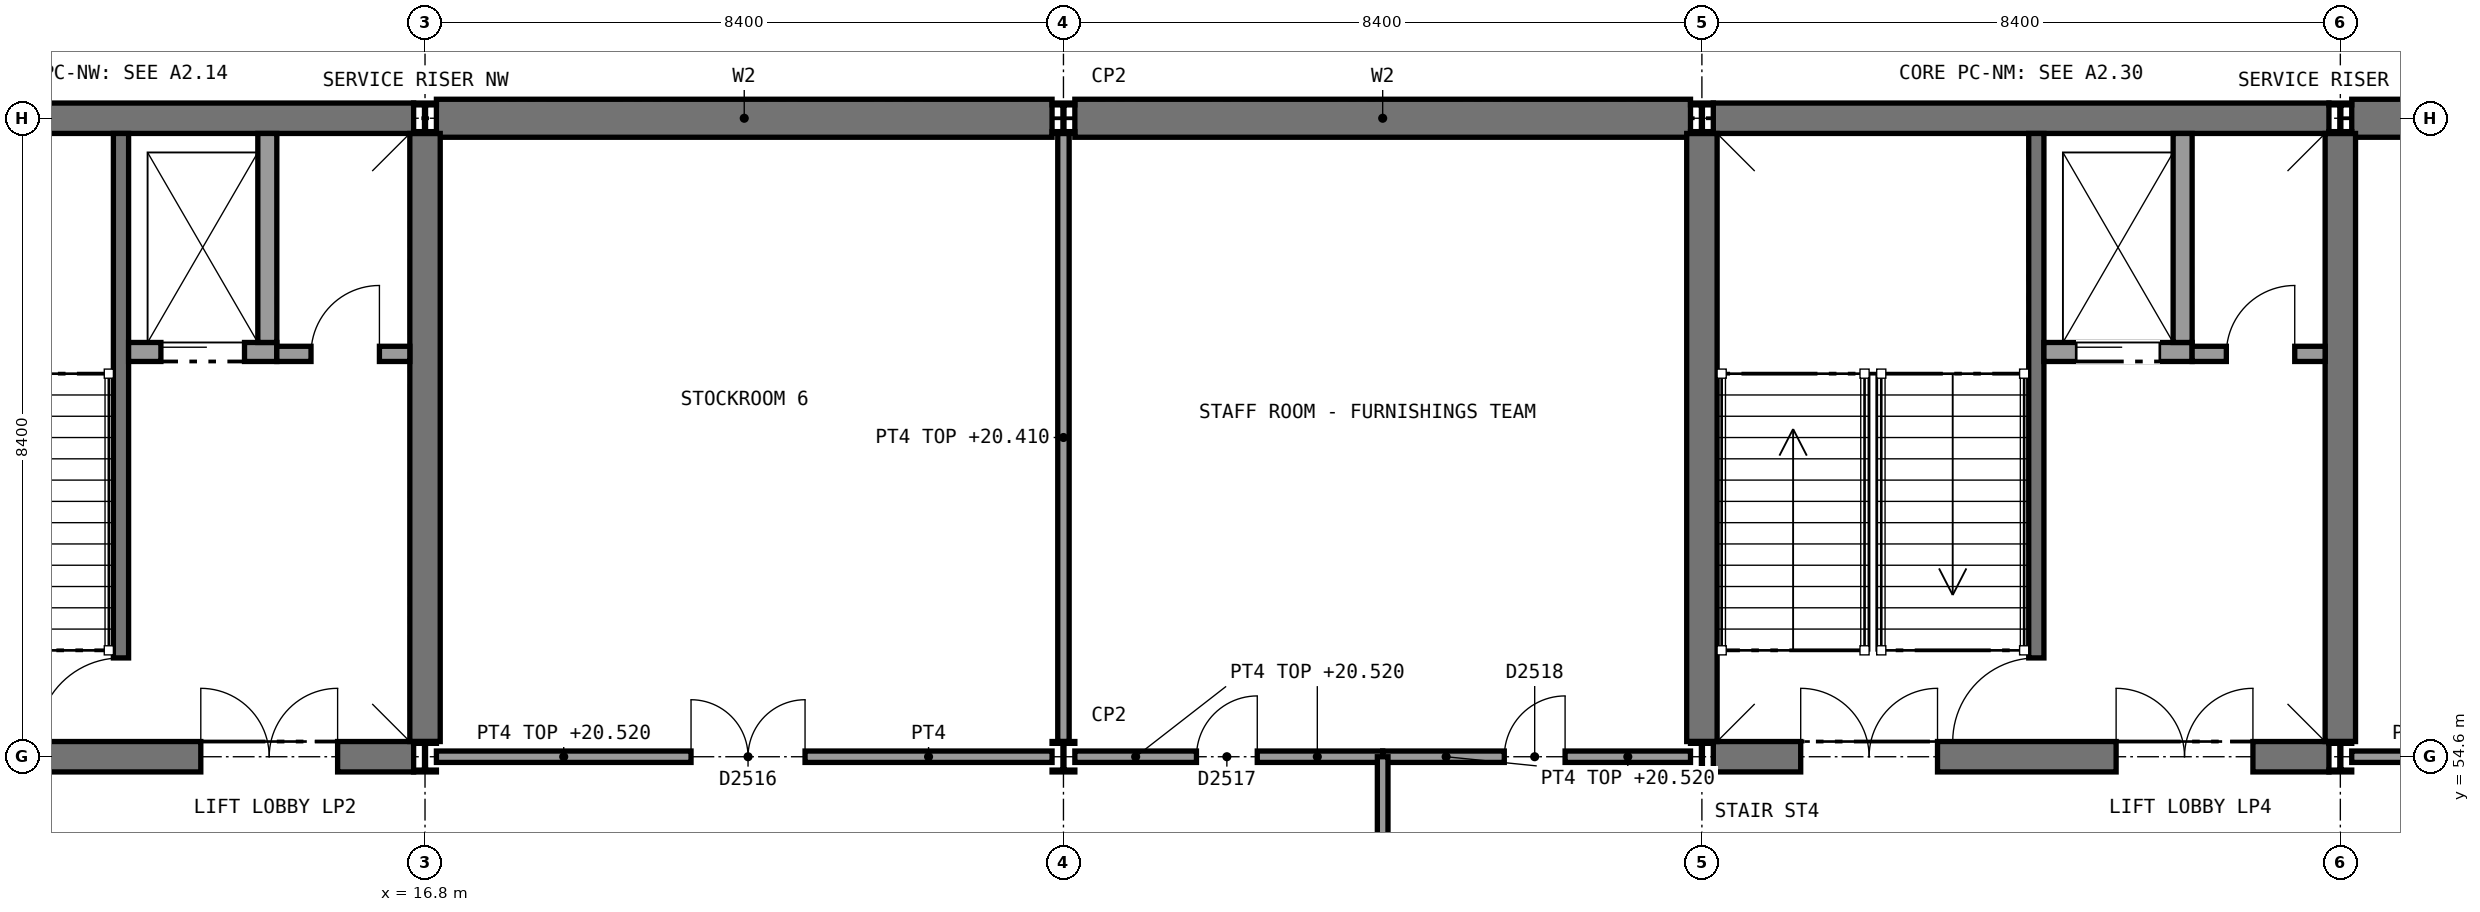
"""IFC4 building model, lengths in metres.
Left out: names, types, materials, properties, quantities, classifications, styles, units other than length and angle.
Written with IfcOpenShell. Run it as: python <this file> out.ifc"""

import sys

from ifc_helpers import new_model, si_unit, direction, frame, frame_2d, origin, origin_2d, place, context, subcontext, project, spatial, rectangle, i_section, extrude, element, fill, save


model = new_model("IFC4")
c1 = context("Model", 3, precision=1e-05, world=origin(), true_north=direction((0.0, 1.0)))
c2 = subcontext(c1, "Body", "Model", "MODEL_VIEW")
j1 = project(units=[si_unit("LENGTHUNIT", "METRE"), si_unit("PLANEANGLEUNIT", "RADIAN")], contexts=[c1])
p1 = place(None, origin())
s1 = spatial("IfcSite", under=j1, at=p1, CompositionType="ELEMENT")
p2 = place(p1, origin())
s2 = spatial("IfcBuilding", under=s1, at=p2, CompositionType="ELEMENT")
p3 = place(p2, frame((0.0, 0.0, 16.2)))
s3 = spatial("IfcBuildingStorey", under=s2, at=p3, CompositionType="ELEMENT", Elevation=16.2)
p4 = place(p3, frame((16.95, 63.0, 0.0), z_axis=(0.0, 0.0, 1.0), x_axis=(1.0, 0.0, 0.0)))
e1 = element("IfcWall", 1, at=p4, inside=s3, PredefinedType="SHEAR", context=c2, shape_type="SweptSolid", body=[
    extrude(rectangle(XDim=8.1, YDim=0.5, at=frame_2d((4.05, 0.0))), origin(), (0.0, 0.0, 1.0), 4.65),
])
p5 = place(p3, frame((25.35, 63.0, 0.0), z_axis=(0.0, 0.0, 1.0), x_axis=(1.0, 0.0, 0.0)))
e2 = element("IfcWall", 2, at=p5, inside=s3, PredefinedType="SHEAR", context=c2, shape_type="SweptSolid", body=[
    extrude(rectangle(XDim=8.1, YDim=0.5, at=frame_2d((4.05, 0.0))), origin(), (0.0, 0.0, 1.0), 4.65),
])
p6 = place(p3, frame((42.15, 63.0, 0.0), z_axis=(0.0, 0.0, 1.0), x_axis=(1.0, 0.0, 0.0)))
e3 = element("IfcWall", 3, at=p6, inside=s3, PredefinedType="SHEAR", context=c2, shape_type="SweptSolid", body=[
    extrude(rectangle(XDim=8.1, YDim=0.5, at=frame_2d((4.05, 0.0))), origin(), (0.0, 0.0, 1.0), 4.65),
])
p7 = place(p3, frame((8.55, 63.0, 0.0), z_axis=(0.0, 0.0, 1.0), x_axis=(1.0, 0.0, 0.0)))
e4 = element("IfcWall", 4, at=p7, inside=s3, PredefinedType="SHEAR", context=c2, shape_type="SweptSolid", body=[
    extrude(rectangle(XDim=8.1, YDim=0.4, at=frame_2d((4.05, 0.0))), origin(), (0.0, 0.0, 1.0), 4.65),
])
p8 = place(p3, frame((8.55, 54.6, 0.0), z_axis=(0.0, 0.0, 1.0), x_axis=(1.0, 0.0, 0.0)))
e5 = element("IfcWall", 5, at=p8, inside=s3, PredefinedType="SHEAR", context=c2, shape_type="SweptSolid", body=[
    extrude(rectangle(XDim=8.1, YDim=0.4, at=frame_2d((4.05, 0.0))), origin(), (0.0, 0.0, 1.0), 4.65),
])
p9 = place(p8, frame((1.15, 0.0, 0.0)))
e6 = element("IfcOpeningElement", 6, at=p9, cuts=e5, PredefinedType="OPENING", context=c2, shape_type="SweptSolid", body=[
    extrude(rectangle(XDim=1.8, YDim=2.1, at=frame_2d((0.9, 1.05))), frame((0.0, 0.21, 0.0), z_axis=(0.0, -1.0, 0.0), x_axis=(1.0, 0.0, 0.0)), (0.0, 0.0, 1.0), 0.42),
])
p10 = place(p8, frame((5.3, 0.0, 0.0)))
e7 = element("IfcOpeningElement", 7, at=p10, cuts=e5, PredefinedType="OPENING", context=c2, shape_type="SweptSolid", body=[
    extrude(rectangle(XDim=1.8, YDim=2.1, at=frame_2d((0.9, 1.05))), frame((0.0, 0.21, 0.0), z_axis=(0.0, -1.0, 0.0), x_axis=(1.0, 0.0, 0.0)), (0.0, 0.0, 1.0), 0.42),
])
p11 = place(p3, frame((16.8, 54.8, 0.0), z_axis=(0.0, 0.0, 1.0), x_axis=(0.0, 1.0, 0.0)))
e8 = element("IfcWall", 8, at=p11, inside=s3, PredefinedType="SHEAR", context=c2, shape_type="SweptSolid", body=[
    extrude(rectangle(XDim=8.0, YDim=0.4, at=frame_2d((4.0, 0.0))), origin(), (0.0, 0.0, 1.0), 4.65),
])
p12 = place(p3, frame((33.75, 63.0, 0.0), z_axis=(0.0, 0.0, 1.0), x_axis=(1.0, 0.0, 0.0)))
e9 = element("IfcWall", 9, at=p12, inside=s3, PredefinedType="SHEAR", context=c2, shape_type="SweptSolid", body=[
    extrude(rectangle(XDim=8.1, YDim=0.4, at=frame_2d((4.05, 0.0))), origin(), (0.0, 0.0, 1.0), 4.65),
])
p13 = place(p3, frame((33.75, 54.6, 0.0), z_axis=(0.0, 0.0, 1.0), x_axis=(1.0, 0.0, 0.0)))
e10 = element("IfcWall", 10, at=p13, inside=s3, PredefinedType="SHEAR", context=c2, shape_type="SweptSolid", body=[
    extrude(rectangle(XDim=8.1, YDim=0.4, at=frame_2d((4.05, 0.0))), origin(), (0.0, 0.0, 1.0), 4.65),
])
p14 = place(p13, frame((1.15, 0.0, 0.0)))
e11 = element("IfcOpeningElement", 11, at=p14, cuts=e10, PredefinedType="OPENING", context=c2, shape_type="SweptSolid", body=[
    extrude(rectangle(XDim=1.8, YDim=2.1, at=frame_2d((0.9, 1.05))), frame((0.0, 0.21, 0.0), z_axis=(0.0, -1.0, 0.0), x_axis=(1.0, 0.0, 0.0)), (0.0, 0.0, 1.0), 0.42),
])
p15 = place(p13, frame((5.3, 0.0, 0.0)))
e12 = element("IfcOpeningElement", 12, at=p15, cuts=e10, PredefinedType="OPENING", context=c2, shape_type="SweptSolid", body=[
    extrude(rectangle(XDim=1.8, YDim=2.1, at=frame_2d((0.9, 1.05))), frame((0.0, 0.21, 0.0), z_axis=(0.0, -1.0, 0.0), x_axis=(1.0, 0.0, 0.0)), (0.0, 0.0, 1.0), 0.42),
])
for number, where, z_axis, x_axis in (
    (13, (33.6, 54.8, 0.0), (0.0, 0.0, 1.0), (0.0, 1.0, 0.0)),
    (14, (42.0, 54.8, 0.0), (0.0, 0.0, 1.0), (0.0, 1.0, 0.0)),
):
    element("IfcWall", number, at=place(p3, frame(where, z_axis=z_axis, x_axis=x_axis)), inside=s3, PredefinedType="SHEAR", context=c2, shape_type="SweptSolid", body=[
        extrude(rectangle(XDim=8.0, YDim=0.4, at=frame_2d((4.0, 0.0))), origin(), (0.0, 0.0, 1.0), 4.65),
    ])
for number, where, z_axis, x_axis in (
    (15, (16.8, 54.6, 0.0), (0.0, 0.0, 1.0), (1.0, 0.0, 0.0)),
    (16, (16.8, 63.0, 0.0), (0.0, 0.0, 1.0), (1.0, 0.0, 0.0)),
    (17, (25.2, 54.6, 0.0), (0.0, 0.0, 1.0), (1.0, 0.0, 0.0)),
    (18, (25.2, 63.0, 0.0), (0.0, 0.0, 1.0), (1.0, 0.0, 0.0)),
    (19, (33.6, 54.6, 0.0), (0.0, 0.0, 1.0), (1.0, 0.0, 0.0)),
    (20, (33.6, 63.0, 0.0), (0.0, 0.0, 1.0), (1.0, 0.0, 0.0)),
    (21, (42.0, 54.6, 0.0), (0.0, 0.0, 1.0), (1.0, 0.0, 0.0)),
    (22, (42.0, 63.0, 0.0), (0.0, 0.0, 1.0), (1.0, 0.0, 0.0)),
):
    element("IfcColumn", number, at=place(p3, frame(where, z_axis=z_axis, x_axis=x_axis)), inside=s3, PredefinedType="COLUMN", context=c2, shape_type="SweptSolid", body=[
        extrude(i_section(OverallWidth=0.3, OverallDepth=0.4, WebThickness=0.013, FlangeThickness=0.024, FilletRadius=0.027, at=origin_2d()), origin(), (0.0, 0.0, 1.0), 4.8),
    ])
p16 = place(p3, frame((25.2, 54.8, 0.0), z_axis=(0.0, 0.0, 1.0), x_axis=(0.0, 1.0, 0.0)))
e23 = element("IfcWall", 23, at=p16, inside=s3, PredefinedType="SOLIDWALL", context=c2, shape_type="SweptSolid", body=[
    extrude(rectangle(XDim=8.0, YDim=0.15, at=frame_2d((4.0, 0.0))), origin(), (0.0, 0.0, 1.0), 4.21),
])
p17 = place(p3, frame((16.95, 54.6, 0.0), z_axis=(0.0, 0.0, 1.0), x_axis=(1.0, 0.0, 0.0)))
e24 = element("IfcWall", 24, at=p17, inside=s3, PredefinedType="SOLIDWALL", context=c2, shape_type="SweptSolid", body=[
    extrude(rectangle(XDim=8.1, YDim=0.15, at=frame_2d((4.05, 0.0))), origin(), (0.0, 0.0, 1.0), 4.32),
])
p18 = place(p17, frame((3.35, 0.0, 0.0)))
e25 = element("IfcOpeningElement", 25, at=p18, cuts=e24, PredefinedType="OPENING", context=c2, shape_type="SweptSolid", body=[
    extrude(rectangle(XDim=1.5, YDim=2.1, at=frame_2d((0.75, 1.05))), frame((0.0, 0.085, 0.0), z_axis=(0.0, -1.0, 0.0), x_axis=(1.0, 0.0, 0.0)), (0.0, 0.0, 1.0), 0.17),
])
p19 = place(p3, frame((25.35, 54.6, 0.0), z_axis=(0.0, 0.0, 1.0), x_axis=(1.0, 0.0, 0.0)))
e26 = element("IfcWall", 26, at=p19, inside=s3, PredefinedType="SOLIDWALL", context=c2, shape_type="SweptSolid", body=[
    extrude(rectangle(XDim=4.05, YDim=0.15, at=frame_2d((2.025, 0.0))), origin(), (0.0, 0.0, 1.0), 4.32),
])
p20 = place(p19, frame((1.6, 0.0, 0.0)))
e27 = element("IfcOpeningElement", 27, at=p20, cuts=e26, PredefinedType="OPENING", context=c2, shape_type="SweptSolid", body=[
    extrude(rectangle(XDim=0.8, YDim=2.1, at=frame_2d((0.4, 1.05))), frame((0.0, 0.085, 0.0), z_axis=(0.0, -1.0, 0.0), x_axis=(1.0, 0.0, 0.0)), (0.0, 0.0, 1.0), 0.17),
])
p21 = place(p3, frame((29.4, 54.6, 0.0), z_axis=(0.0, 0.0, 1.0), x_axis=(1.0, 0.0, 0.0)))
e28 = element("IfcWall", 28, at=p21, inside=s3, PredefinedType="SOLIDWALL", context=c2, shape_type="SweptSolid", body=[
    extrude(rectangle(XDim=4.05, YDim=0.15, at=frame_2d((2.025, 0.0))), origin(), (0.0, 0.0, 1.0), 4.32),
])
p22 = place(p21, frame((1.6, 0.0, 0.0)))
e29 = element("IfcOpeningElement", 29, at=p22, cuts=e28, PredefinedType="OPENING", context=c2, shape_type="SweptSolid", body=[
    extrude(rectangle(XDim=0.8, YDim=2.1, at=frame_2d((0.4, 1.05))), frame((0.0, 0.085, 0.0), z_axis=(0.0, -1.0, 0.0), x_axis=(1.0, 0.0, 0.0)), (0.0, 0.0, 1.0), 0.17),
])
p23 = place(p3, frame((42.15, 54.6, 0.0), z_axis=(0.0, 0.0, 1.0), x_axis=(1.0, 0.0, 0.0)))
e30 = element("IfcWall", 30, at=p23, inside=s3, PredefinedType="SOLIDWALL", context=c2, shape_type="SweptSolid", body=[
    extrude(rectangle(XDim=8.1, YDim=0.15, at=frame_2d((4.05, 0.0))), origin(), (0.0, 0.0, 1.0), 4.32),
])
p24 = place(p23, frame((3.35, 0.0, 0.0)))
e31 = element("IfcOpeningElement", 31, at=p24, cuts=e30, PredefinedType="OPENING", context=c2, shape_type="SweptSolid", body=[
    extrude(rectangle(XDim=1.5, YDim=2.1, at=frame_2d((0.75, 1.05))), frame((0.0, 0.085, 0.0), z_axis=(0.0, -1.0, 0.0), x_axis=(1.0, 0.0, 0.0)), (0.0, 0.0, 1.0), 0.17),
])
p25 = place(p3, frame((29.4, 47.2, 0.0), z_axis=(0.0, 0.0, 1.0), x_axis=(0.0, 1.0, 0.0)))
e32 = element("IfcWall", 32, at=p25, inside=s3, PredefinedType="PARTITIONING", context=c2, shape_type="SweptSolid", body=[
    extrude(rectangle(XDim=7.4, YDim=0.14, at=frame_2d((3.7, 0.0))), origin(), (0.0, 0.0, 1.0), 4.65),
])
p26 = place(p3, frame((12.8, 62.8, 0.0), z_axis=(0.0, 0.0, 1.0), x_axis=(0.0, -1.0, 0.0)))
e33 = element("IfcWall", 33, at=p26, inside=s3, PredefinedType="SHEAR", context=c2, shape_type="SweptSolid", body=[
    extrude(rectangle(XDim=8.0, YDim=0.2, at=frame_2d((4.0, 0.0))), origin(), (0.0, 0.0, 1.0), 4.65),
])
p27 = place(p26, frame((6.9, 0.0, 0.0)))
e34 = element("IfcOpeningElement", 34, at=p27, cuts=e33, PredefinedType="OPENING", context=c2, shape_type="SweptSolid", body=[
    extrude(rectangle(XDim=1.11, YDim=2.1, at=frame_2d((0.555, 1.05))), frame((0.0, 0.11, 0.0), z_axis=(0.0, -1.0, 0.0), x_axis=(1.0, 0.0, 0.0)), (0.0, 0.0, 1.0), 0.22),
])
p28 = place(p3, frame((12.9, 59.925, 0.0), z_axis=(0.0, 0.0, 1.0), x_axis=(1.0, 0.0, 0.0)))
e35 = element("IfcWall", 35, at=p28, inside=s3, PredefinedType="SOLIDWALL", context=c2, shape_type="SweptSolid", body=[
    extrude(rectangle(XDim=1.95, YDim=0.25, at=frame_2d((0.975, 0.0))), origin(), (0.0, 0.0, 1.0), 4.8),
])
p29 = place(p28, frame((0.425, 0.0, 0.0)))
e36 = element("IfcOpeningElement", 36, at=p29, cuts=e35, PredefinedType="OPENING", context=c2, shape_type="SweptSolid", body=[
    extrude(rectangle(XDim=1.1, YDim=2.1, at=frame_2d((0.55, 1.05))), frame((0.0, 0.135, 0.0), z_axis=(0.0, -1.0, 0.0), x_axis=(1.0, 0.0, 0.0)), (0.0, 0.0, 1.0), 0.27),
])
p30 = place(p3, frame((14.725, 62.8, 0.0), z_axis=(0.0, 0.0, 1.0), x_axis=(0.0, -1.0, 0.0)))
e37 = element("IfcWall", 37, at=p30, inside=s3, PredefinedType="SOLIDWALL", context=c2, shape_type="SweptSolid", body=[
    extrude(rectangle(XDim=2.75, YDim=0.25, at=frame_2d((1.375, 0.0))), origin(), (0.0, 0.0, 1.0), 4.8),
])
p31 = place(p3, frame((14.85, 59.9, 0.0), z_axis=(0.0, 0.0, 1.0), x_axis=(1.0, 0.0, 0.0)))
e38 = element("IfcWall", 38, at=p31, inside=s3, PredefinedType="PARTITIONING", context=c2, shape_type="SweptSolid", body=[
    extrude(rectangle(XDim=1.75, YDim=0.2, at=frame_2d((0.875, 0.0))), origin(), (0.0, 0.0, 1.0), 4.65),
])
p32 = place(p31, frame((0.45, 0.0, 0.0)))
e39 = element("IfcOpeningElement", 39, at=p32, cuts=e38, PredefinedType="OPENING", context=c2, shape_type="SweptSolid", body=[
    extrude(rectangle(XDim=0.9, YDim=2.1, at=frame_2d((0.45, 1.05))), frame((0.0, 0.11, 0.0), z_axis=(0.0, -1.0, 0.0), x_axis=(1.0, 0.0, 0.0)), (0.0, 0.0, 1.0), 0.22),
])
p33 = place(p3, frame((38.0, 62.8, 0.0), z_axis=(0.0, 0.0, 1.0), x_axis=(0.0, -1.0, 0.0)))
e40 = element("IfcWall", 40, at=p33, inside=s3, PredefinedType="SHEAR", context=c2, shape_type="SweptSolid", body=[
    extrude(rectangle(XDim=8.0, YDim=0.2, at=frame_2d((4.0, 0.0))), origin(), (0.0, 0.0, 1.0), 4.65),
])
p34 = place(p33, frame((6.9, 0.0, 0.0)))
e41 = element("IfcOpeningElement", 41, at=p34, cuts=e40, PredefinedType="OPENING", context=c2, shape_type="SweptSolid", body=[
    extrude(rectangle(XDim=1.11, YDim=2.1, at=frame_2d((0.555, 1.05))), frame((0.0, 0.11, 0.0), z_axis=(0.0, -1.0, 0.0), x_axis=(1.0, 0.0, 0.0)), (0.0, 0.0, 1.0), 0.22),
])
p35 = place(p3, frame((38.1, 59.925, 0.0), z_axis=(0.0, 0.0, 1.0), x_axis=(1.0, 0.0, 0.0)))
e42 = element("IfcWall", 42, at=p35, inside=s3, PredefinedType="SOLIDWALL", context=c2, shape_type="SweptSolid", body=[
    extrude(rectangle(XDim=1.95, YDim=0.25, at=frame_2d((0.975, 0.0))), origin(), (0.0, 0.0, 1.0), 4.8),
])
p36 = place(p35, frame((0.425, 0.0, 0.0)))
e43 = element("IfcOpeningElement", 43, at=p36, cuts=e42, PredefinedType="OPENING", context=c2, shape_type="SweptSolid", body=[
    extrude(rectangle(XDim=1.1, YDim=2.1, at=frame_2d((0.55, 1.05))), frame((0.0, 0.135, 0.0), z_axis=(0.0, -1.0, 0.0), x_axis=(1.0, 0.0, 0.0)), (0.0, 0.0, 1.0), 0.27),
])
p37 = place(p3, frame((39.925, 62.8, 0.0), z_axis=(0.0, 0.0, 1.0), x_axis=(0.0, -1.0, 0.0)))
e44 = element("IfcWall", 44, at=p37, inside=s3, PredefinedType="SOLIDWALL", context=c2, shape_type="SweptSolid", body=[
    extrude(rectangle(XDim=2.75, YDim=0.25, at=frame_2d((1.375, 0.0))), origin(), (0.0, 0.0, 1.0), 4.8),
])
p38 = place(p3, frame((40.05, 59.9, 0.0), z_axis=(0.0, 0.0, 1.0), x_axis=(1.0, 0.0, 0.0)))
e45 = element("IfcWall", 45, at=p38, inside=s3, PredefinedType="PARTITIONING", context=c2, shape_type="SweptSolid", body=[
    extrude(rectangle(XDim=1.75, YDim=0.2, at=frame_2d((0.875, 0.0))), origin(), (0.0, 0.0, 1.0), 4.65),
])
p39 = place(p38, frame((0.45, 0.0, 0.0)))
e46 = element("IfcOpeningElement", 46, at=p39, cuts=e45, PredefinedType="OPENING", context=c2, shape_type="SweptSolid", body=[
    extrude(rectangle(XDim=0.9, YDim=2.1, at=frame_2d((0.45, 1.05))), frame((0.0, 0.11, 0.0), z_axis=(0.0, -1.0, 0.0), x_axis=(1.0, 0.0, 0.0)), (0.0, 0.0, 1.0), 0.22),
])
p40 = place(p18, origin())
e47 = element("IfcDoor", 47, at=p40, inside=s3, OperationType="DOUBLE_DOOR_SINGLE_SWING", PredefinedType="DOOR", context=c2, shape_type="SweptSolid", body=[
    extrude(rectangle(XDim=1.5, YDim=2.1, at=frame_2d((0.75, 1.05))), frame((0.0, 0.025, 0.0), z_axis=(0.0, -1.0, 0.0), x_axis=(1.0, 0.0, 0.0)), (0.0, 0.0, 1.0), 0.05),
])
fill(e25, e47)
p41 = place(p20, origin())
e48 = element("IfcDoor", 48, at=p41, inside=s3, OperationType="SINGLE_SWING_RIGHT", PredefinedType="DOOR", context=c2, shape_type="SweptSolid", body=[
    extrude(rectangle(XDim=0.8, YDim=2.1, at=frame_2d((0.4, 1.05))), frame((0.0, 0.025, 0.0), z_axis=(0.0, -1.0, 0.0), x_axis=(1.0, 0.0, 0.0)), (0.0, 0.0, 1.0), 0.05),
])
fill(e27, e48)
p42 = place(p22, origin())
e49 = element("IfcDoor", 49, at=p42, inside=s3, OperationType="SINGLE_SWING_RIGHT", PredefinedType="DOOR", context=c2, shape_type="SweptSolid", body=[
    extrude(rectangle(XDim=0.8, YDim=2.1, at=frame_2d((0.4, 1.05))), frame((0.0, 0.025, 0.0), z_axis=(0.0, -1.0, 0.0), x_axis=(1.0, 0.0, 0.0)), (0.0, 0.0, 1.0), 0.05),
])
fill(e29, e49)
p43 = place(p27, frame((1.1, 0.0, 0.0), z_axis=(0.0, 0.0, 1.0), x_axis=(-1.0, 0.0, 0.0)))
e50 = element("IfcDoor", 50, at=p43, inside=s3, OperationType="SINGLE_SWING_LEFT", PredefinedType="DOOR", context=c2, shape_type="SweptSolid", body=[
    extrude(rectangle(XDim=1.1, YDim=2.1, at=frame_2d((0.55, 1.05))), frame((0.0, 0.025, 0.0), z_axis=(0.0, -1.0, 0.0), x_axis=(1.0, 0.0, 0.0)), (0.0, 0.0, 1.0), 0.05),
])
fill(e34, e50)
p44 = place(p29, frame((1.1, 0.0, 0.0), z_axis=(0.0, 0.0, 1.0), x_axis=(-1.0, 0.0, 0.0)))
e51 = element("IfcDoor", 51, at=p44, inside=s3, OperationType="SLIDING_TO_RIGHT", PredefinedType="DOOR", context=c2, shape_type="SweptSolid", body=[
    extrude(rectangle(XDim=1.1, YDim=2.1, at=frame_2d((0.55, 1.05))), frame((0.0, 0.025, 0.0), z_axis=(0.0, -1.0, 0.0), x_axis=(1.0, 0.0, 0.0)), (0.0, 0.0, 1.0), 0.05),
])
fill(e36, e51)
p45 = place(p32, origin())
e52 = element("IfcDoor", 52, at=p45, inside=s3, OperationType="SINGLE_SWING_RIGHT", PredefinedType="DOOR", context=c2, shape_type="SweptSolid", body=[
    extrude(rectangle(XDim=0.9, YDim=2.1, at=frame_2d((0.45, 1.05))), frame((0.0, 0.025, 0.0), z_axis=(0.0, -1.0, 0.0), x_axis=(1.0, 0.0, 0.0)), (0.0, 0.0, 1.0), 0.05),
])
fill(e39, e52)
p46 = place(p10, origin())
e53 = element("IfcDoor", 53, at=p46, inside=s3, OperationType="DOUBLE_DOOR_SINGLE_SWING", PredefinedType="DOOR", context=c2, shape_type="SweptSolid", body=[
    extrude(rectangle(XDim=1.8, YDim=2.1, at=frame_2d((0.9, 1.05))), frame((0.0, 0.025, 0.0), z_axis=(0.0, -1.0, 0.0), x_axis=(1.0, 0.0, 0.0)), (0.0, 0.0, 1.0), 0.05),
])
fill(e7, e53)
p47 = place(p34, frame((1.1, 0.0, 0.0), z_axis=(0.0, 0.0, 1.0), x_axis=(-1.0, 0.0, 0.0)))
e54 = element("IfcDoor", 54, at=p47, inside=s3, OperationType="SINGLE_SWING_LEFT", PredefinedType="DOOR", context=c2, shape_type="SweptSolid", body=[
    extrude(rectangle(XDim=1.1, YDim=2.1, at=frame_2d((0.55, 1.05))), frame((0.0, 0.025, 0.0), z_axis=(0.0, -1.0, 0.0), x_axis=(1.0, 0.0, 0.0)), (0.0, 0.0, 1.0), 0.05),
])
fill(e41, e54)
p48 = place(p36, frame((1.1, 0.0, 0.0), z_axis=(0.0, 0.0, 1.0), x_axis=(-1.0, 0.0, 0.0)))
e55 = element("IfcDoor", 55, at=p48, inside=s3, OperationType="SLIDING_TO_RIGHT", PredefinedType="DOOR", context=c2, shape_type="SweptSolid", body=[
    extrude(rectangle(XDim=1.1, YDim=2.1, at=frame_2d((0.55, 1.05))), frame((0.0, 0.025, 0.0), z_axis=(0.0, -1.0, 0.0), x_axis=(1.0, 0.0, 0.0)), (0.0, 0.0, 1.0), 0.05),
])
fill(e43, e55)
p49 = place(p39, origin())
e56 = element("IfcDoor", 56, at=p49, inside=s3, OperationType="SINGLE_SWING_RIGHT", PredefinedType="DOOR", context=c2, shape_type="SweptSolid", body=[
    extrude(rectangle(XDim=0.9, YDim=2.1, at=frame_2d((0.45, 1.05))), frame((0.0, 0.025, 0.0), z_axis=(0.0, -1.0, 0.0), x_axis=(1.0, 0.0, 0.0)), (0.0, 0.0, 1.0), 0.05),
])
fill(e46, e56)
p50 = place(p14, origin())
e57 = element("IfcDoor", 57, at=p50, inside=s3, OperationType="DOUBLE_DOOR_SINGLE_SWING", PredefinedType="DOOR", context=c2, shape_type="SweptSolid", body=[
    extrude(rectangle(XDim=1.8, YDim=2.1, at=frame_2d((0.9, 1.05))), frame((0.0, 0.025, 0.0), z_axis=(0.0, -1.0, 0.0), x_axis=(1.0, 0.0, 0.0)), (0.0, 0.0, 1.0), 0.05),
])
fill(e11, e57)
p51 = place(p15, origin())
e58 = element("IfcDoor", 58, at=p51, inside=s3, OperationType="DOUBLE_DOOR_SINGLE_SWING", PredefinedType="DOOR", context=c2, shape_type="SweptSolid", body=[
    extrude(rectangle(XDim=1.8, YDim=2.1, at=frame_2d((0.9, 1.05))), frame((0.0, 0.025, 0.0), z_axis=(0.0, -1.0, 0.0), x_axis=(1.0, 0.0, 0.0)), (0.0, 0.0, 1.0), 0.05),
])
fill(e12, e58)
save(model, sys.argv[1])
